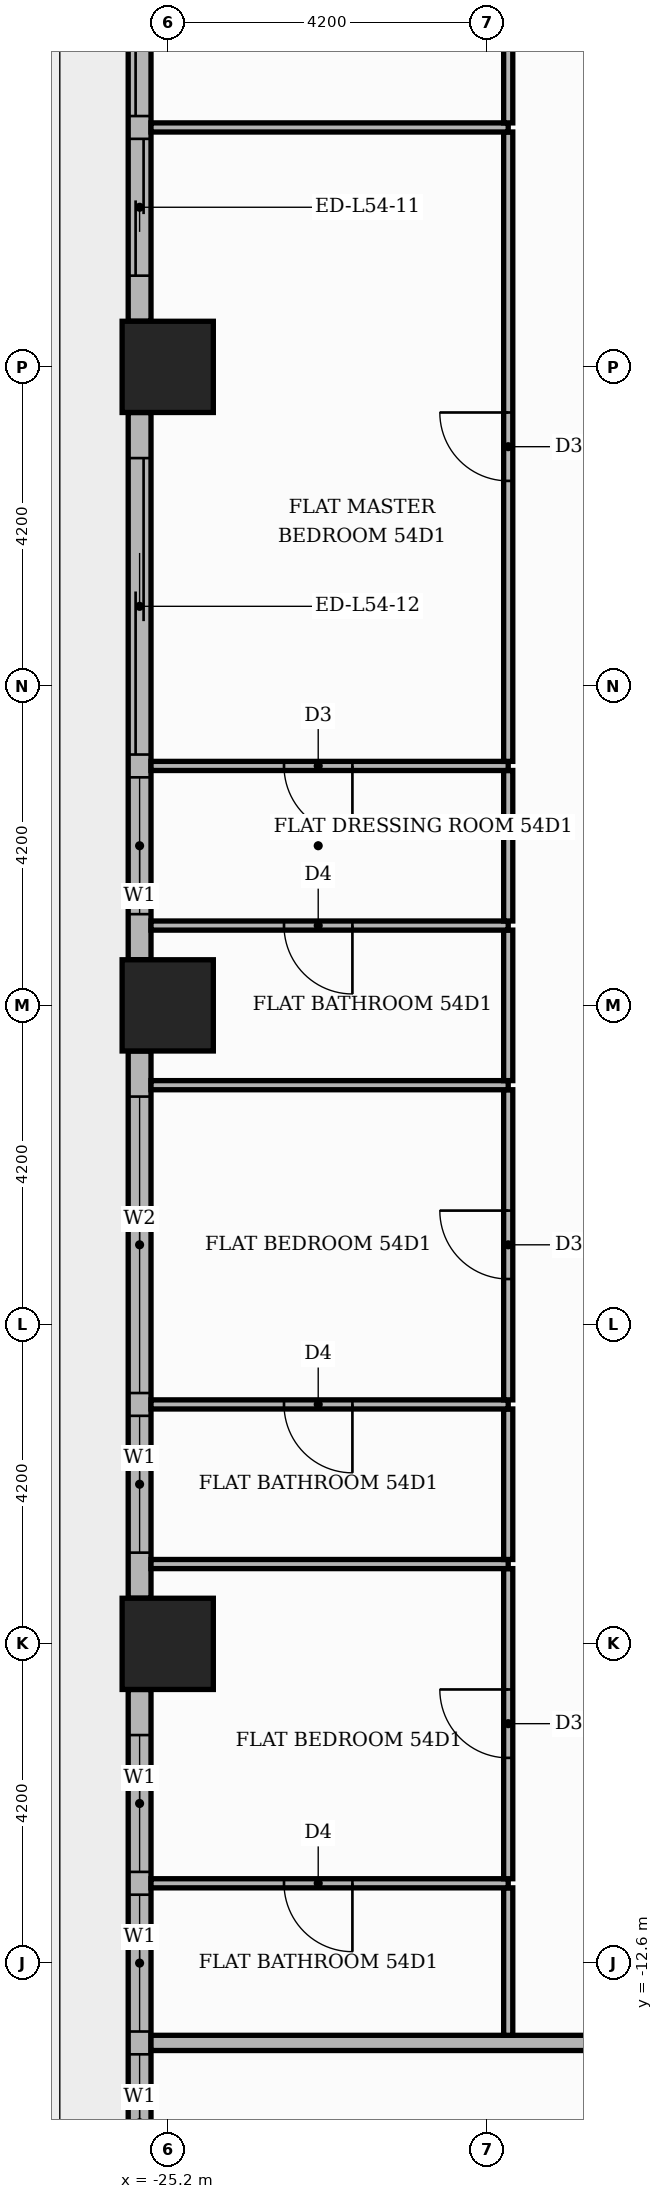
"""IFC4 building model, lengths in metres.
Left out: names, types, materials, properties, quantities, classifications, styles, units other than length and angle.
Written with IfcOpenShell. Run it as: python <this file> out.ifc"""

import sys

from ifc_helpers import new_model, si_unit, direction, frame, frame_2d, origin, origin_2d, place, context, subcontext, project, spatial, rectangle, extrude, element, fill, save


model = new_model("IFC4")
c1 = context("Model", 3, precision=1e-05, world=origin(), true_north=direction((0.0, 1.0)))
c2 = subcontext(c1, "Body", "Model", "MODEL_VIEW")
j1 = project(units=[si_unit("LENGTHUNIT", "METRE"), si_unit("PLANEANGLEUNIT", "RADIAN")], contexts=[c1])
p1 = place(None, origin())
s1 = spatial("IfcSite", under=j1, at=p1, CompositionType="ELEMENT")
p2 = place(p1, origin())
s2 = spatial("IfcBuilding", under=s1, at=p2, CompositionType="ELEMENT")
p3 = place(p2, frame((0.0, 0.0, 227.4)))
s3 = spatial("IfcBuildingStorey", under=s2, at=p3, CompositionType="ELEMENT", Elevation=227.4)
for number, where, z_axis, x_axis in (
    (1, (-25.2, 0.0, 0.0), (0.0, 0.0, 1.0), (1.0, 0.0, 0.0)),
    (2, (-25.2, -8.4, 0.0), (0.0, 0.0, 1.0), (1.0, 0.0, 0.0)),
    (3, (-25.2, 8.4, 0.0), (0.0, 0.0, 1.0), (1.0, 0.0, 0.0)),
):
    element("IfcColumn", number, at=place(p3, frame(where, z_axis=z_axis, x_axis=x_axis)), inside=s3, PredefinedType="COLUMN", context=c2, shape_type="SweptSolid", body=[
        extrude(rectangle(XDim=1.2, YDim=1.2, at=origin_2d()), origin(), (0.0, 0.0, 1.0), 3.9),
    ])
p4 = place(p3, frame((-25.57, 16.2, 0.0), z_axis=(0.0, 0.0, 1.0), x_axis=(0.0, -1.0, 0.0)))
e4 = element("IfcWall", 4, at=p4, inside=s3, PredefinedType="STANDARD", context=c2, shape_type="SweptSolid", body=[
    extrude(rectangle(XDim=7.2, YDim=0.3, at=frame_2d((3.6, 0.0))), origin(), (0.0, 0.0, 1.0), 3.48),
])
p5 = place(p4, frame((0.6, 0.0, 0.0)))
e5 = element("IfcOpeningElement", 5, at=p5, cuts=e4, PredefinedType="OPENING", context=c2, shape_type="SweptSolid", body=[
    extrude(rectangle(XDim=3.9, YDim=2.4, at=frame_2d((1.95, 1.2))), frame((0.0, 0.16, 0.0), z_axis=(0.0, -1.0, 0.0), x_axis=(1.0, 0.0, 0.0)), (0.0, 0.0, 1.0), 0.32),
])
p6 = place(p4, frame((4.8, 0.0, 0.0)))
e6 = element("IfcOpeningElement", 6, at=p6, cuts=e4, PredefinedType="OPENING", context=c2, shape_type="SweptSolid", body=[
    extrude(rectangle(XDim=1.8, YDim=2.4, at=frame_2d((0.9, 1.2))), frame((0.0, 0.16, 0.0), z_axis=(0.0, -1.0, 0.0), x_axis=(1.0, 0.0, 0.0)), (0.0, 0.0, 1.0), 0.32),
])
p7 = place(p3, frame((-25.57, 7.8, 0.0), z_axis=(0.0, 0.0, 1.0), x_axis=(0.0, -1.0, 0.0)))
e7 = element("IfcWall", 7, at=p7, inside=s3, PredefinedType="STANDARD", context=c2, shape_type="SweptSolid", body=[
    extrude(rectangle(XDim=7.2, YDim=0.3, at=frame_2d((3.6, 0.0))), origin(), (0.0, 0.0, 1.0), 3.48),
])
p8 = place(p7, frame((0.6, 0.0, 0.0)))
e8 = element("IfcOpeningElement", 8, at=p8, cuts=e7, PredefinedType="OPENING", context=c2, shape_type="SweptSolid", body=[
    extrude(rectangle(XDim=3.9, YDim=2.4, at=frame_2d((1.95, 1.2))), frame((0.0, 0.16, 0.0), z_axis=(0.0, -1.0, 0.0), x_axis=(1.0, 0.0, 0.0)), (0.0, 0.0, 1.0), 0.32),
])
p9 = place(p7, frame((4.8, 0.0, 0.9)))
e9 = element("IfcOpeningElement", 9, at=p9, cuts=e7, PredefinedType="OPENING", context=c2, shape_type="SweptSolid", body=[
    extrude(rectangle(XDim=1.8, YDim=2.1, at=frame_2d((0.9, 1.05))), frame((0.0, 0.16, 0.0), z_axis=(0.0, -1.0, 0.0), x_axis=(1.0, 0.0, 0.0)), (0.0, 0.0, 1.0), 0.32),
])
p10 = place(p3, frame((-25.57, -0.6, 0.0), z_axis=(0.0, 0.0, 1.0), x_axis=(0.0, -1.0, 0.0)))
e10 = element("IfcWall", 10, at=p10, inside=s3, PredefinedType="STANDARD", context=c2, shape_type="SweptSolid", body=[
    extrude(rectangle(XDim=7.2, YDim=0.3, at=frame_2d((3.6, 0.0))), origin(), (0.0, 0.0, 1.0), 3.48),
])
p11 = place(p10, frame((0.6, 0.0, 0.9)))
e11 = element("IfcOpeningElement", 11, at=p11, cuts=e10, PredefinedType="OPENING", context=c2, shape_type="SweptSolid", body=[
    extrude(rectangle(XDim=3.9, YDim=2.1, at=frame_2d((1.95, 1.05))), frame((0.0, 0.16, 0.0), z_axis=(0.0, -1.0, 0.0), x_axis=(1.0, 0.0, 0.0)), (0.0, 0.0, 1.0), 0.32),
])
p12 = place(p10, frame((4.8, 0.0, 0.9)))
e12 = element("IfcOpeningElement", 12, at=p12, cuts=e10, PredefinedType="OPENING", context=c2, shape_type="SweptSolid", body=[
    extrude(rectangle(XDim=1.8, YDim=2.1, at=frame_2d((0.9, 1.05))), frame((0.0, 0.16, 0.0), z_axis=(0.0, -1.0, 0.0), x_axis=(1.0, 0.0, 0.0)), (0.0, 0.0, 1.0), 0.32),
])
p13 = place(p3, frame((-25.57, -9.0, 0.0), z_axis=(0.0, 0.0, 1.0), x_axis=(0.0, -1.0, 0.0)))
e13 = element("IfcWall", 13, at=p13, inside=s3, PredefinedType="STANDARD", context=c2, shape_type="SweptSolid", body=[
    extrude(rectangle(XDim=7.2, YDim=0.3, at=frame_2d((3.6, 0.0))), origin(), (0.0, 0.0, 1.0), 3.48),
])
p14 = place(p13, frame((0.6, 0.0, 0.9)))
e14 = element("IfcOpeningElement", 14, at=p14, cuts=e13, PredefinedType="OPENING", context=c2, shape_type="SweptSolid", body=[
    extrude(rectangle(XDim=1.8, YDim=2.1, at=frame_2d((0.9, 1.05))), frame((0.0, 0.16, 0.0), z_axis=(0.0, -1.0, 0.0), x_axis=(1.0, 0.0, 0.0)), (0.0, 0.0, 1.0), 0.32),
])
p15 = place(p13, frame((2.7, 0.0, 0.9)))
e15 = element("IfcOpeningElement", 15, at=p15, cuts=e13, PredefinedType="OPENING", context=c2, shape_type="SweptSolid", body=[
    extrude(rectangle(XDim=1.8, YDim=2.1, at=frame_2d((0.9, 1.05))), frame((0.0, 0.16, 0.0), z_axis=(0.0, -1.0, 0.0), x_axis=(1.0, 0.0, 0.0)), (0.0, 0.0, 1.0), 0.32),
])
p16 = place(p13, frame((4.8, 0.0, 0.9)))
e16 = element("IfcOpeningElement", 16, at=p16, cuts=e13, PredefinedType="OPENING", context=c2, shape_type="SweptSolid", body=[
    extrude(rectangle(XDim=1.8, YDim=2.1, at=frame_2d((0.9, 1.05))), frame((0.0, 0.16, 0.0), z_axis=(0.0, -1.0, 0.0), x_axis=(1.0, 0.0, 0.0)), (0.0, 0.0, 1.0), 0.32),
])
p17 = place(p3, frame((-25.42, -13.65, 0.0), z_axis=(0.0, 0.0, 1.0), x_axis=(1.0, 0.0, 0.0)))
e17 = element("IfcWall", 17, at=p17, inside=s3, PredefinedType="PARTITIONING", context=c2, shape_type="SweptSolid", body=[
    extrude(rectangle(XDim=39.07, YDim=0.2, at=frame_2d((19.535, 0.0))), origin(), (0.0, 0.0, 1.0), 3.48),
])
p18 = place(p17, frame((13.32, 0.0, 0.0)))
e18 = element("IfcOpeningElement", 18, at=p18, cuts=e17, PredefinedType="OPENING", context=c2, shape_type="SweptSolid", body=[
    extrude(rectangle(XDim=1.1, YDim=2.4, at=frame_2d((0.55, 1.2))), frame((0.0, 0.11, 0.0), z_axis=(0.0, -1.0, 0.0), x_axis=(1.0, 0.0, 0.0)), (0.0, 0.0, 1.0), 0.22),
])
p19 = place(p17, frame((23.82, 0.0, 0.0)))
e19 = element("IfcOpeningElement", 19, at=p19, cuts=e17, PredefinedType="OPENING", context=c2, shape_type="SweptSolid", body=[
    extrude(rectangle(XDim=1.1, YDim=2.4, at=frame_2d((0.55, 1.2))), frame((0.0, 0.11, 0.0), z_axis=(0.0, -1.0, 0.0), x_axis=(1.0, 0.0, 0.0)), (0.0, 0.0, 1.0), 0.22),
])
p20 = place(p3, frame((-20.72, -13.55, 0.0), z_axis=(0.0, 0.0, 1.0), x_axis=(0.0, 1.0, 0.0)))
e20 = element("IfcWall", 20, at=p20, inside=s3, PredefinedType="PARTITIONING", context=c2, shape_type="SweptSolid", body=[
    extrude(rectangle(XDim=1.94, YDim=0.12, at=frame_2d((0.97, 0.0))), origin(), (0.0, 0.0, 1.0), 3.48),
])
p21 = place(p3, frame((-25.42, -11.55, 0.0), z_axis=(0.0, 0.0, 1.0), x_axis=(1.0, 0.0, 0.0)))
e21 = element("IfcWall", 21, at=p21, inside=s3, PredefinedType="PARTITIONING", context=c2, shape_type="SweptSolid", body=[
    extrude(rectangle(XDim=4.7, YDim=0.12, at=frame_2d((2.35, 0.0))), origin(), (0.0, 0.0, 1.0), 3.48),
])
p22 = place(p21, frame((1.75, 0.0, 0.0)))
e22 = element("IfcOpeningElement", 22, at=p22, cuts=e21, PredefinedType="OPENING", context=c2, shape_type="SweptSolid", body=[
    extrude(rectangle(XDim=0.9, YDim=2.1, at=frame_2d((0.45, 1.05))), frame((0.0, 0.07, 0.0), z_axis=(0.0, -1.0, 0.0), x_axis=(1.0, 0.0, 0.0)), (0.0, 0.0, 1.0), 0.14),
])
p23 = place(p3, frame((-20.72, -11.49, 0.0), z_axis=(0.0, 0.0, 1.0), x_axis=(0.0, 1.0, 0.0)))
e23 = element("IfcWall", 23, at=p23, inside=s3, PredefinedType="PARTITIONING", context=c2, shape_type="SweptSolid", body=[
    extrude(rectangle(XDim=4.08, YDim=0.12, at=frame_2d((2.04, 0.0))), origin(), (0.0, 0.0, 1.0), 3.48),
])
p24 = place(p23, frame((1.59, 0.0, 0.0)))
e24 = element("IfcOpeningElement", 24, at=p24, cuts=e23, PredefinedType="OPENING", context=c2, shape_type="SweptSolid", body=[
    extrude(rectangle(XDim=0.9, YDim=2.1, at=frame_2d((0.45, 1.05))), frame((0.0, 0.07, 0.0), z_axis=(0.0, -1.0, 0.0), x_axis=(1.0, 0.0, 0.0)), (0.0, 0.0, 1.0), 0.14),
])
p25 = place(p3, frame((-25.42, -7.35, 0.0), z_axis=(0.0, 0.0, 1.0), x_axis=(1.0, 0.0, 0.0)))
e25 = element("IfcWall", 25, at=p25, inside=s3, PredefinedType="PARTITIONING", context=c2, shape_type="SweptSolid", body=[
    extrude(rectangle(XDim=4.7, YDim=0.12, at=frame_2d((2.35, 0.0))), origin(), (0.0, 0.0, 1.0), 3.48),
])
p26 = place(p3, frame((-20.72, -7.29, 0.0), z_axis=(0.0, 0.0, 1.0), x_axis=(0.0, 1.0, 0.0)))
e26 = element("IfcWall", 26, at=p26, inside=s3, PredefinedType="PARTITIONING", context=c2, shape_type="SweptSolid", body=[
    extrude(rectangle(XDim=1.98, YDim=0.12, at=frame_2d((0.99, 0.0))), origin(), (0.0, 0.0, 1.0), 3.48),
])
p27 = place(p3, frame((-25.42, -5.25, 0.0), z_axis=(0.0, 0.0, 1.0), x_axis=(1.0, 0.0, 0.0)))
e27 = element("IfcWall", 27, at=p27, inside=s3, PredefinedType="PARTITIONING", context=c2, shape_type="SweptSolid", body=[
    extrude(rectangle(XDim=4.7, YDim=0.12, at=frame_2d((2.35, 0.0))), origin(), (0.0, 0.0, 1.0), 3.48),
])
p28 = place(p27, frame((1.75, 0.0, 0.0)))
e28 = element("IfcOpeningElement", 28, at=p28, cuts=e27, PredefinedType="OPENING", context=c2, shape_type="SweptSolid", body=[
    extrude(rectangle(XDim=0.9, YDim=2.1, at=frame_2d((0.45, 1.05))), frame((0.0, 0.07, 0.0), z_axis=(0.0, -1.0, 0.0), x_axis=(1.0, 0.0, 0.0)), (0.0, 0.0, 1.0), 0.14),
])
p29 = place(p3, frame((-20.72, -5.19, 0.0), z_axis=(0.0, 0.0, 1.0), x_axis=(0.0, 1.0, 0.0)))
e29 = element("IfcWall", 29, at=p29, inside=s3, PredefinedType="PARTITIONING", context=c2, shape_type="SweptSolid", body=[
    extrude(rectangle(XDim=4.08, YDim=0.12, at=frame_2d((2.04, 0.0))), origin(), (0.0, 0.0, 1.0), 3.48),
])
p30 = place(p29, frame((1.59, 0.0, 0.0)))
e30 = element("IfcOpeningElement", 30, at=p30, cuts=e29, PredefinedType="OPENING", context=c2, shape_type="SweptSolid", body=[
    extrude(rectangle(XDim=0.9, YDim=2.1, at=frame_2d((0.45, 1.05))), frame((0.0, 0.07, 0.0), z_axis=(0.0, -1.0, 0.0), x_axis=(1.0, 0.0, 0.0)), (0.0, 0.0, 1.0), 0.14),
])
p31 = place(p3, frame((-25.42, -1.05, 0.0), z_axis=(0.0, 0.0, 1.0), x_axis=(1.0, 0.0, 0.0)))
e31 = element("IfcWall", 31, at=p31, inside=s3, PredefinedType="PARTITIONING", context=c2, shape_type="SweptSolid", body=[
    extrude(rectangle(XDim=4.7, YDim=0.12, at=frame_2d((2.35, 0.0))), origin(), (0.0, 0.0, 1.0), 3.48),
])
p32 = place(p3, frame((-20.72, -0.99, 0.0), z_axis=(0.0, 0.0, 1.0), x_axis=(0.0, 1.0, 0.0)))
e32 = element("IfcWall", 32, at=p32, inside=s3, PredefinedType="PARTITIONING", context=c2, shape_type="SweptSolid", body=[
    extrude(rectangle(XDim=1.98, YDim=0.12, at=frame_2d((0.99, 0.0))), origin(), (0.0, 0.0, 1.0), 3.48),
])
p33 = place(p3, frame((-25.42, 1.05, 0.0), z_axis=(0.0, 0.0, 1.0), x_axis=(1.0, 0.0, 0.0)))
e33 = element("IfcWall", 33, at=p33, inside=s3, PredefinedType="PARTITIONING", context=c2, shape_type="SweptSolid", body=[
    extrude(rectangle(XDim=4.7, YDim=0.12, at=frame_2d((2.35, 0.0))), origin(), (0.0, 0.0, 1.0), 3.48),
])
p34 = place(p33, frame((1.75, 0.0, 0.0)))
e34 = element("IfcOpeningElement", 34, at=p34, cuts=e33, PredefinedType="OPENING", context=c2, shape_type="SweptSolid", body=[
    extrude(rectangle(XDim=0.9, YDim=2.1, at=frame_2d((0.45, 1.05))), frame((0.0, 0.07, 0.0), z_axis=(0.0, -1.0, 0.0), x_axis=(1.0, 0.0, 0.0)), (0.0, 0.0, 1.0), 0.14),
])
p35 = place(p3, frame((-20.72, 1.11, 0.0), z_axis=(0.0, 0.0, 1.0), x_axis=(0.0, 1.0, 0.0)))
e35 = element("IfcWall", 35, at=p35, inside=s3, PredefinedType="PARTITIONING", context=c2, shape_type="SweptSolid", body=[
    extrude(rectangle(XDim=1.98, YDim=0.12, at=frame_2d((0.99, 0.0))), origin(), (0.0, 0.0, 1.0), 3.48),
])
p36 = place(p3, frame((-25.42, 3.15, 0.0), z_axis=(0.0, 0.0, 1.0), x_axis=(1.0, 0.0, 0.0)))
e36 = element("IfcWall", 36, at=p36, inside=s3, PredefinedType="PARTITIONING", context=c2, shape_type="SweptSolid", body=[
    extrude(rectangle(XDim=4.7, YDim=0.12, at=frame_2d((2.35, 0.0))), origin(), (0.0, 0.0, 1.0), 3.48),
])
p37 = place(p36, frame((1.75, 0.0, 0.0)))
e37 = element("IfcOpeningElement", 37, at=p37, cuts=e36, PredefinedType="OPENING", context=c2, shape_type="SweptSolid", body=[
    extrude(rectangle(XDim=0.9, YDim=2.1, at=frame_2d((0.45, 1.05))), frame((0.0, 0.07, 0.0), z_axis=(0.0, -1.0, 0.0), x_axis=(1.0, 0.0, 0.0)), (0.0, 0.0, 1.0), 0.14),
])
p38 = place(p3, frame((-20.72, 3.21, 0.0), z_axis=(0.0, 0.0, 1.0), x_axis=(0.0, 1.0, 0.0)))
e38 = element("IfcWall", 38, at=p38, inside=s3, PredefinedType="PARTITIONING", context=c2, shape_type="SweptSolid", body=[
    extrude(rectangle(XDim=8.28, YDim=0.12, at=frame_2d((4.14, 0.0))), origin(), (0.0, 0.0, 1.0), 3.48),
])
p39 = place(p38, frame((3.69, 0.0, 0.0)))
e39 = element("IfcOpeningElement", 39, at=p39, cuts=e38, PredefinedType="OPENING", context=c2, shape_type="SweptSolid", body=[
    extrude(rectangle(XDim=0.9, YDim=2.1, at=frame_2d((0.45, 1.05))), frame((0.0, 0.07, 0.0), z_axis=(0.0, -1.0, 0.0), x_axis=(1.0, 0.0, 0.0)), (0.0, 0.0, 1.0), 0.14),
])
p40 = place(p3, frame((-25.42, 11.55, 0.0), z_axis=(0.0, 0.0, 1.0), x_axis=(1.0, 0.0, 0.0)))
e40 = element("IfcWall", 40, at=p40, inside=s3, PredefinedType="PARTITIONING", context=c2, shape_type="SweptSolid", body=[
    extrude(rectangle(XDim=4.7, YDim=0.12, at=frame_2d((2.35, 0.0))), origin(), (0.0, 0.0, 1.0), 3.48),
])
p41 = place(p3, frame((-20.72, 11.61, 0.0), z_axis=(0.0, 0.0, 1.0), x_axis=(0.0, 1.0, 0.0)))
e41 = element("IfcWall", 41, at=p41, inside=s3, PredefinedType="PARTITIONING", context=c2, shape_type="SweptSolid", body=[
    extrude(rectangle(XDim=4.08, YDim=0.12, at=frame_2d((2.04, 0.0))), origin(), (0.0, 0.0, 1.0), 3.48),
])
p42 = place(p41, frame((1.54, 0.0, 0.0)))
e42 = element("IfcOpeningElement", 42, at=p42, cuts=e41, PredefinedType="OPENING", context=c2, shape_type="SweptSolid", body=[
    extrude(rectangle(XDim=1.0, YDim=2.1, at=frame_2d((0.5, 1.05))), frame((0.0, 0.07, 0.0), z_axis=(0.0, -1.0, 0.0), x_axis=(1.0, 0.0, 0.0)), (0.0, 0.0, 1.0), 0.14),
])
p43 = place(p5, origin())
e43 = element("IfcDoor", 43, at=p43, inside=s3, OperationType="SLIDING_TO_LEFT", PredefinedType="DOOR", context=c2, shape_type="SweptSolid", body=[
    extrude(rectangle(XDim=3.9, YDim=2.4, at=frame_2d((1.95, 1.2))), frame((0.0, 0.025, 0.0), z_axis=(0.0, -1.0, 0.0), x_axis=(1.0, 0.0, 0.0)), (0.0, 0.0, 1.0), 0.05),
])
fill(e5, e43)
p44 = place(p6, origin())
e44 = element("IfcDoor", 44, at=p44, inside=s3, OperationType="SLIDING_TO_RIGHT", PredefinedType="DOOR", context=c2, shape_type="SweptSolid", body=[
    extrude(rectangle(XDim=1.8, YDim=2.4, at=frame_2d((0.9, 1.2))), frame((0.0, 0.025, 0.0), z_axis=(0.0, -1.0, 0.0), x_axis=(1.0, 0.0, 0.0)), (0.0, 0.0, 1.0), 0.05),
])
fill(e6, e44)
p45 = place(p8, origin())
e45 = element("IfcDoor", 45, at=p45, inside=s3, OperationType="SLIDING_TO_LEFT", PredefinedType="DOOR", context=c2, shape_type="SweptSolid", body=[
    extrude(rectangle(XDim=3.9, YDim=2.4, at=frame_2d((1.95, 1.2))), frame((0.0, 0.025, 0.0), z_axis=(0.0, -1.0, 0.0), x_axis=(1.0, 0.0, 0.0)), (0.0, 0.0, 1.0), 0.05),
])
fill(e8, e45)
p46 = place(p9, origin())
e46 = element("IfcWindow", 46, at=p46, inside=s3, PartitioningType="SINGLE_PANEL", PredefinedType="WINDOW", context=c2, shape_type="SweptSolid", body=[
    extrude(rectangle(XDim=1.8, YDim=2.1, at=frame_2d((0.9, 1.05))), frame((0.0, 0.03, 0.0), z_axis=(0.0, -1.0, 0.0), x_axis=(1.0, 0.0, 0.0)), (0.0, 0.0, 1.0), 0.06),
])
fill(e9, e46)
p47 = place(p11, origin())
e47 = element("IfcWindow", 47, at=p47, inside=s3, PartitioningType="SINGLE_PANEL", PredefinedType="WINDOW", context=c2, shape_type="SweptSolid", body=[
    extrude(rectangle(XDim=3.9, YDim=2.1, at=frame_2d((1.95, 1.05))), frame((0.0, 0.03, 0.0), z_axis=(0.0, -1.0, 0.0), x_axis=(1.0, 0.0, 0.0)), (0.0, 0.0, 1.0), 0.06),
])
fill(e11, e47)
p48 = place(p12, origin())
e48 = element("IfcWindow", 48, at=p48, inside=s3, PartitioningType="SINGLE_PANEL", PredefinedType="WINDOW", context=c2, shape_type="SweptSolid", body=[
    extrude(rectangle(XDim=1.8, YDim=2.1, at=frame_2d((0.9, 1.05))), frame((0.0, 0.03, 0.0), z_axis=(0.0, -1.0, 0.0), x_axis=(1.0, 0.0, 0.0)), (0.0, 0.0, 1.0), 0.06),
])
fill(e12, e48)
p49 = place(p14, origin())
e49 = element("IfcWindow", 49, at=p49, inside=s3, PartitioningType="SINGLE_PANEL", PredefinedType="WINDOW", context=c2, shape_type="SweptSolid", body=[
    extrude(rectangle(XDim=1.8, YDim=2.1, at=frame_2d((0.9, 1.05))), frame((0.0, 0.03, 0.0), z_axis=(0.0, -1.0, 0.0), x_axis=(1.0, 0.0, 0.0)), (0.0, 0.0, 1.0), 0.06),
])
fill(e14, e49)
p50 = place(p15, origin())
e50 = element("IfcWindow", 50, at=p50, inside=s3, PartitioningType="SINGLE_PANEL", PredefinedType="WINDOW", context=c2, shape_type="SweptSolid", body=[
    extrude(rectangle(XDim=1.8, YDim=2.1, at=frame_2d((0.9, 1.05))), frame((0.0, 0.03, 0.0), z_axis=(0.0, -1.0, 0.0), x_axis=(1.0, 0.0, 0.0)), (0.0, 0.0, 1.0), 0.06),
])
fill(e15, e50)
p51 = place(p16, origin())
e51 = element("IfcWindow", 51, at=p51, inside=s3, PartitioningType="SINGLE_PANEL", PredefinedType="WINDOW", context=c2, shape_type="SweptSolid", body=[
    extrude(rectangle(XDim=1.8, YDim=2.1, at=frame_2d((0.9, 1.05))), frame((0.0, 0.03, 0.0), z_axis=(0.0, -1.0, 0.0), x_axis=(1.0, 0.0, 0.0)), (0.0, 0.0, 1.0), 0.06),
])
fill(e16, e51)
p52 = place(p39, origin())
e52 = element("IfcDoor", 52, at=p52, inside=s3, OperationType="SINGLE_SWING_RIGHT", PredefinedType="DOOR", context=c2, shape_type="SweptSolid", body=[
    extrude(rectangle(XDim=0.9, YDim=2.1, at=frame_2d((0.45, 1.05))), frame((0.0, 0.025, 0.0), z_axis=(0.0, -1.0, 0.0), x_axis=(1.0, 0.0, 0.0)), (0.0, 0.0, 1.0), 0.05),
])
fill(e39, e52)
p53 = place(p37, frame((0.9, 0.0, 0.0), z_axis=(0.0, 0.0, 1.0), x_axis=(-1.0, 0.0, 0.0)))
e53 = element("IfcDoor", 53, at=p53, inside=s3, OperationType="SINGLE_SWING_RIGHT", PredefinedType="DOOR", context=c2, shape_type="SweptSolid", body=[
    extrude(rectangle(XDim=0.9, YDim=2.1, at=frame_2d((0.45, 1.05))), frame((0.0, 0.025, 0.0), z_axis=(0.0, -1.0, 0.0), x_axis=(1.0, 0.0, 0.0)), (0.0, 0.0, 1.0), 0.05),
])
fill(e37, e53)
p54 = place(p34, frame((0.9, 0.0, 0.0), z_axis=(0.0, 0.0, 1.0), x_axis=(-1.0, 0.0, 0.0)))
e54 = element("IfcDoor", 54, at=p54, inside=s3, OperationType="SINGLE_SWING_RIGHT", PredefinedType="DOOR", context=c2, shape_type="SweptSolid", body=[
    extrude(rectangle(XDim=0.9, YDim=2.1, at=frame_2d((0.45, 1.05))), frame((0.0, 0.025, 0.0), z_axis=(0.0, -1.0, 0.0), x_axis=(1.0, 0.0, 0.0)), (0.0, 0.0, 1.0), 0.05),
])
fill(e34, e54)
p55 = place(p30, origin())
e55 = element("IfcDoor", 55, at=p55, inside=s3, OperationType="SINGLE_SWING_RIGHT", PredefinedType="DOOR", context=c2, shape_type="SweptSolid", body=[
    extrude(rectangle(XDim=0.9, YDim=2.1, at=frame_2d((0.45, 1.05))), frame((0.0, 0.025, 0.0), z_axis=(0.0, -1.0, 0.0), x_axis=(1.0, 0.0, 0.0)), (0.0, 0.0, 1.0), 0.05),
])
fill(e30, e55)
p56 = place(p28, frame((0.9, 0.0, 0.0), z_axis=(0.0, 0.0, 1.0), x_axis=(-1.0, 0.0, 0.0)))
e56 = element("IfcDoor", 56, at=p56, inside=s3, OperationType="SINGLE_SWING_RIGHT", PredefinedType="DOOR", context=c2, shape_type="SweptSolid", body=[
    extrude(rectangle(XDim=0.9, YDim=2.1, at=frame_2d((0.45, 1.05))), frame((0.0, 0.025, 0.0), z_axis=(0.0, -1.0, 0.0), x_axis=(1.0, 0.0, 0.0)), (0.0, 0.0, 1.0), 0.05),
])
fill(e28, e56)
p57 = place(p24, origin())
e57 = element("IfcDoor", 57, at=p57, inside=s3, OperationType="SINGLE_SWING_RIGHT", PredefinedType="DOOR", context=c2, shape_type="SweptSolid", body=[
    extrude(rectangle(XDim=0.9, YDim=2.1, at=frame_2d((0.45, 1.05))), frame((0.0, 0.025, 0.0), z_axis=(0.0, -1.0, 0.0), x_axis=(1.0, 0.0, 0.0)), (0.0, 0.0, 1.0), 0.05),
])
fill(e24, e57)
p58 = place(p22, frame((0.9, 0.0, 0.0), z_axis=(0.0, 0.0, 1.0), x_axis=(-1.0, 0.0, 0.0)))
e58 = element("IfcDoor", 58, at=p58, inside=s3, OperationType="SINGLE_SWING_RIGHT", PredefinedType="DOOR", context=c2, shape_type="SweptSolid", body=[
    extrude(rectangle(XDim=0.9, YDim=2.1, at=frame_2d((0.45, 1.05))), frame((0.0, 0.025, 0.0), z_axis=(0.0, -1.0, 0.0), x_axis=(1.0, 0.0, 0.0)), (0.0, 0.0, 1.0), 0.05),
])
fill(e22, e58)
save(model, sys.argv[1])
